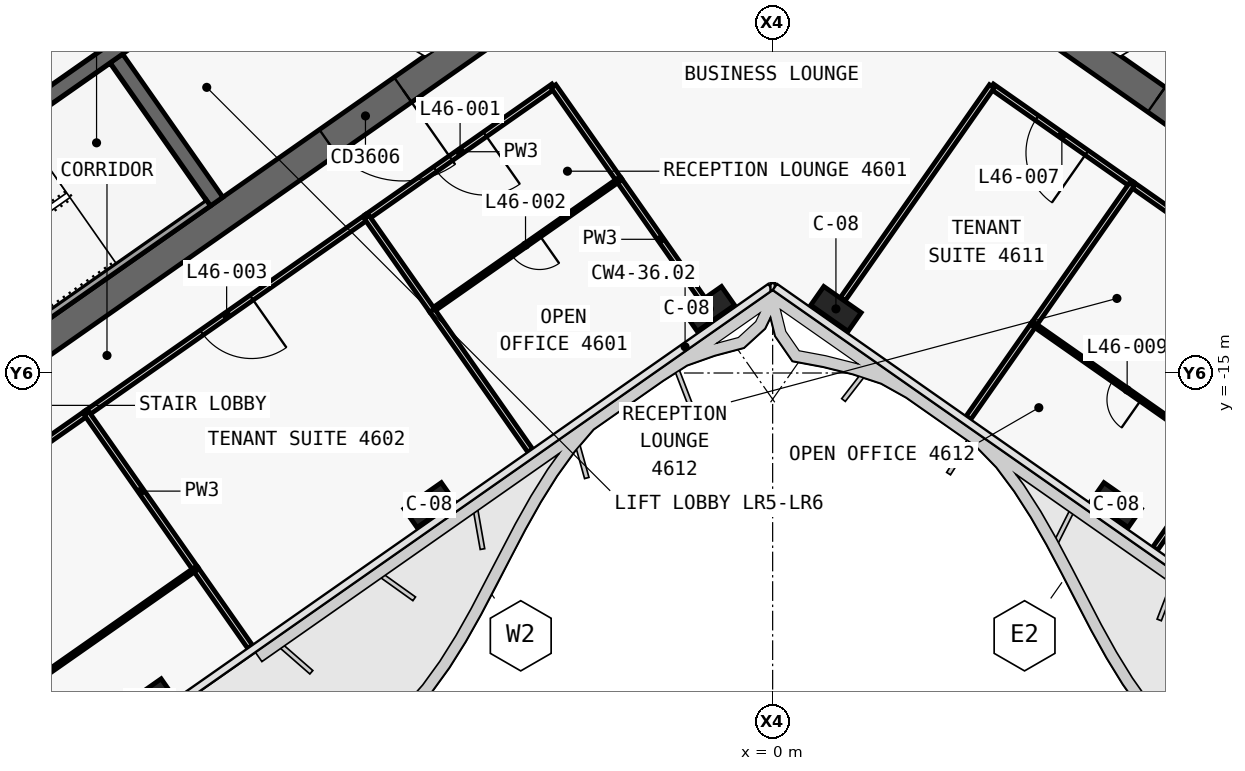
"""IFC4 building model, lengths in metres.
Left out: names, types, materials, properties, quantities, classifications, styles, units other than length and angle.
Written with IfcOpenShell. Run it as: python <this file> out.ifc"""

import sys

from ifc_helpers import new_model, si_unit, direction, frame, frame_2d, origin, origin_2d, place, context, subcontext, project, spatial, polyline, rectangle, outline, extrude, element, fill, save


model = new_model("IFC4")
c1 = context("Model", 3, precision=1e-05, world=origin(), true_north=direction((0.0, 1.0)))
c2 = subcontext(c1, "Body", "Model", "MODEL_VIEW")
j1 = project(units=[si_unit("LENGTHUNIT", "METRE"), si_unit("PLANEANGLEUNIT", "RADIAN")], contexts=[c1])
p1 = place(None, origin())
s1 = spatial("IfcSite", under=j1, at=p1, CompositionType="ELEMENT")
p2 = place(p1, origin())
s2 = spatial("IfcBuilding", under=s1, at=p2, CompositionType="ELEMENT")
p3 = place(p2, frame((0.0, 0.0, 198.3)))
s3 = spatial("IfcBuildingStorey", under=s2, at=p3, CompositionType="ELEMENT", Elevation=198.3)
p4 = place(p3, frame((0.029, 11.984, 0.0), z_axis=(0.0, 0.0, 1.0), x_axis=(-0.819151382952, -0.573577380837, 0.0)))
e1 = element("IfcWall", 1, at=p4, inside=s3, PredefinedType="SHEAR", context=c2, shape_type="SweptSolid", body=[
    extrude(outline(polyline([(33.898, 0.4), (0.56, 0.4), (-0.0, -0.4), (33.898, -0.4), (33.898, 0.4)])), origin(), (0.0, 0.0, 1.0), 3.9),
])
p5 = place(p3, frame((0.029, -0.712, 0.0), z_axis=(0.0, 0.0, 1.0), x_axis=(-0.819151758019, -0.573576845187, 0.0)))
e2 = element("IfcWall", 2, at=p5, inside=s3, PredefinedType="SHEAR", context=c2, shape_type="SweptSolid", body=[
    extrude(outline(polyline([(26.616, 0.4), (0.56, 0.4), (-0.0, -0.4), (26.616, -0.4), (26.616, 0.4)])), origin(), (0.0, 0.0, 1.0), 3.9),
])
p6 = place(p5, frame((2.966, 0.0, 0.0)))
e3 = element("IfcOpeningElement", 3, at=p6, cuts=e2, PredefinedType="OPENING", context=c2, shape_type="SweptSolid", body=[
    extrude(rectangle(XDim=2.4, YDim=2.1, at=frame_2d((1.2, 1.05))), frame((0.0, 0.41, 0.0), z_axis=(0.0, -1.0, 0.0), x_axis=(1.0, 0.0, 0.0)), (0.0, 0.0, 1.0), 0.82),
])
p7 = place(p5, frame((11.916, 0.0, 0.0)))
e4 = element("IfcOpeningElement", 4, at=p7, cuts=e2, PredefinedType="OPENING", context=c2, shape_type="SweptSolid", body=[
    extrude(rectangle(XDim=2.4, YDim=2.1, at=frame_2d((1.2, 1.05))), frame((0.0, 0.41, 0.0), z_axis=(0.0, -1.0, 0.0), x_axis=(1.0, 0.0, 0.0)), (0.0, 0.0, 1.0), 0.82),
])
p8 = place(p3, frame((-14.63, -10.488, 0.0), z_axis=(0.0, 0.0, 1.0), x_axis=(-0.573611936273, 0.819127185829, 0.0)))
e5 = element("IfcWall", 5, at=p8, inside=s3, PredefinedType="SHEAR", context=c2, shape_type="SweptSolid", body=[
    extrude(outline(polyline([(4.6, 0.2), (0.0, 0.2), (0.0, -0.2), (4.6, -0.2), (4.6, 0.2)])), origin(), (0.0, 0.0, 1.0), 3.9),
])
p9 = place(p3, frame((-2.638, 3.768, 0.0), z_axis=(0.0, 0.0, 1.0), x_axis=(-0.81915267502, -0.573575535572, 0.0)))
e6 = element("IfcWall", 6, at=p9, inside=s3, PredefinedType="SHEAR", context=c2, shape_type="SweptSolid", body=[
    extrude(outline(polyline([(26.2, 0.2), (0.0, 0.2), (0.0, -0.2), (26.2, -0.2), (26.2, 0.2)])), origin(), (0.0, 0.0, 1.0), 3.9),
])
p10 = place(p9, frame((1.169, 0.0, 0.0)))
e7 = element("IfcOpeningElement", 7, at=p10, cuts=e6, PredefinedType="OPENING", context=c2, shape_type="SweptSolid", body=[
    extrude(rectangle(XDim=1.1, YDim=2.1, at=frame_2d((0.55, 1.05))), frame((0.0, 0.21, 0.0), z_axis=(0.0, -1.0, 0.0), x_axis=(1.0, 0.0, 0.0)), (0.0, 0.0, 1.0), 0.42),
])
p11 = place(p9, frame((3.206, 0.0, 0.0)))
e8 = element("IfcOpeningElement", 8, at=p11, cuts=e6, PredefinedType="OPENING", context=c2, shape_type="SweptSolid", body=[
    extrude(rectangle(XDim=1.1, YDim=2.1, at=frame_2d((0.55, 1.05))), frame((0.0, 0.21, 0.0), z_axis=(0.0, -1.0, 0.0), x_axis=(1.0, 0.0, 0.0)), (0.0, 0.0, 1.0), 0.42),
])
p12 = place(p9, frame((5.244, 0.0, 0.0)))
e9 = element("IfcOpeningElement", 9, at=p12, cuts=e6, PredefinedType="OPENING", context=c2, shape_type="SweptSolid", body=[
    extrude(rectangle(XDim=1.1, YDim=2.1, at=frame_2d((0.55, 1.05))), frame((0.0, 0.21, 0.0), z_axis=(0.0, -1.0, 0.0), x_axis=(1.0, 0.0, 0.0)), (0.0, 0.0, 1.0), 0.42),
])
p13 = place(p9, frame((7.281, 0.0, 0.0)))
e10 = element("IfcOpeningElement", 10, at=p13, cuts=e6, PredefinedType="OPENING", context=c2, shape_type="SweptSolid", body=[
    extrude(rectangle(XDim=1.1, YDim=2.1, at=frame_2d((0.55, 1.05))), frame((0.0, 0.21, 0.0), z_axis=(0.0, -1.0, 0.0), x_axis=(1.0, 0.0, 0.0)), (0.0, 0.0, 1.0), 0.42),
])
p14 = place(p9, frame((9.688, 0.0, 0.0)))
e11 = element("IfcOpeningElement", 11, at=p14, cuts=e6, PredefinedType="OPENING", context=c2, shape_type="SweptSolid", body=[
    extrude(rectangle(XDim=1.1, YDim=2.1, at=frame_2d((0.55, 1.05))), frame((0.0, 0.21, 0.0), z_axis=(0.0, -1.0, 0.0), x_axis=(1.0, 0.0, 0.0)), (0.0, 0.0, 1.0), 0.42),
])
p15 = place(p9, frame((11.863, 0.0, 0.0)))
e12 = element("IfcOpeningElement", 12, at=p15, cuts=e6, PredefinedType="OPENING", context=c2, shape_type="SweptSolid", body=[
    extrude(rectangle(XDim=1.1, YDim=2.1, at=frame_2d((0.55, 1.05))), frame((0.0, 0.21, 0.0), z_axis=(0.0, -1.0, 0.0), x_axis=(1.0, 0.0, 0.0)), (0.0, 0.0, 1.0), 0.42),
])
p16 = place(p9, frame((13.722, 0.0, 0.0)))
e13 = element("IfcOpeningElement", 13, at=p16, cuts=e6, PredefinedType="OPENING", context=c2, shape_type="SweptSolid", body=[
    extrude(rectangle(XDim=1.0, YDim=2.1, at=frame_2d((0.5, 1.05))), frame((0.0, 0.21, 0.0), z_axis=(0.0, -1.0, 0.0), x_axis=(1.0, 0.0, 0.0)), (0.0, 0.0, 1.0), 0.42),
])
p17 = place(p9, frame((15.798, 0.0, 0.0)))
e14 = element("IfcOpeningElement", 14, at=p17, cuts=e6, PredefinedType="OPENING", context=c2, shape_type="SweptSolid", body=[
    extrude(rectangle(XDim=1.0, YDim=2.1, at=frame_2d((0.5, 1.05))), frame((0.0, 0.21, 0.0), z_axis=(0.0, -1.0, 0.0), x_axis=(1.0, 0.0, 0.0)), (0.0, 0.0, 1.0), 0.42),
])
p18 = place(p3, frame((-0.029, 11.984, 0.0), z_axis=(0.0, 0.0, 1.0), x_axis=(0.819151382952, -0.573577380837, 0.0)))
e15 = element("IfcWall", 15, at=p18, inside=s3, PredefinedType="SHEAR", context=c2, shape_type="SweptSolid", body=[
    extrude(outline(polyline([(33.898, 0.4), (-0.0, 0.4), (0.56, -0.4), (33.898, -0.4), (33.898, 0.4)])), origin(), (0.0, 0.0, 1.0), 3.9),
])
p19 = place(p3, frame((-0.029, -0.712, 0.0), z_axis=(0.0, 0.0, 1.0), x_axis=(0.819151758019, -0.573576845187, 0.0)))
e16 = element("IfcWall", 16, at=p19, inside=s3, PredefinedType="SHEAR", context=c2, shape_type="SweptSolid", body=[
    extrude(outline(polyline([(26.616, 0.4), (-0.0, 0.4), (0.56, -0.4), (26.616, -0.4), (26.616, 0.4)])), origin(), (0.0, 0.0, 1.0), 3.9),
])
p20 = place(p19, frame((1.166, 0.0, 0.0)))
e17 = element("IfcOpeningElement", 17, at=p20, cuts=e16, PredefinedType="OPENING", context=c2, shape_type="SweptSolid", body=[
    extrude(rectangle(XDim=1.5, YDim=2.1, at=frame_2d((0.75, 1.05))), frame((0.0, 0.41, 0.0), z_axis=(0.0, -1.0, 0.0), x_axis=(1.0, 0.0, 0.0)), (0.0, 0.0, 1.0), 0.82),
])
p21 = place(p19, frame((12.366, 0.0, 0.0)))
e18 = element("IfcOpeningElement", 18, at=p21, cuts=e16, PredefinedType="OPENING", context=c2, shape_type="SweptSolid", body=[
    extrude(rectangle(XDim=1.5, YDim=2.1, at=frame_2d((0.75, 1.05))), frame((0.0, 0.41, 0.0), z_axis=(0.0, -1.0, 0.0), x_axis=(1.0, 0.0, 0.0)), (0.0, 0.0, 1.0), 0.82),
])
p22 = place(p3, frame((2.638, 3.768, 0.0), z_axis=(0.0, 0.0, 1.0), x_axis=(0.81915267502, -0.573575535572, 0.0)))
e19 = element("IfcWall", 19, at=p22, inside=s3, PredefinedType="SHEAR", context=c2, shape_type="SweptSolid", body=[
    extrude(outline(polyline([(0.0, 0.2), (0.0, -0.2), (26.2, -0.2), (26.2, 0.2), (0.0, 0.2)])), origin(), (0.0, 0.0, 1.0), 3.9),
])
p23 = place(p22, frame((9.637, 0.0, 0.0)))
e20 = element("IfcOpeningElement", 20, at=p23, cuts=e19, PredefinedType="OPENING", context=c2, shape_type="SweptSolid", body=[
    extrude(rectangle(XDim=1.2, YDim=2.1, at=frame_2d((0.6, 1.05))), frame((0.0, 0.21, 0.0), z_axis=(0.0, -1.0, 0.0), x_axis=(1.0, 0.0, 0.0)), (0.0, 0.0, 1.0), 0.42),
])
p24 = place(p22, frame((11.812, 0.0, 0.0)))
e21 = element("IfcOpeningElement", 21, at=p24, cuts=e19, PredefinedType="OPENING", context=c2, shape_type="SweptSolid", body=[
    extrude(rectangle(XDim=1.2, YDim=2.1, at=frame_2d((0.6, 1.05))), frame((0.0, 0.21, 0.0), z_axis=(0.0, -1.0, 0.0), x_axis=(1.0, 0.0, 0.0)), (0.0, 0.0, 1.0), 0.42),
])
p25 = place(p22, frame((13.988, 0.0, 0.0)))
e22 = element("IfcOpeningElement", 22, at=p25, cuts=e19, PredefinedType="OPENING", context=c2, shape_type="SweptSolid", body=[
    extrude(rectangle(XDim=1.2, YDim=2.1, at=frame_2d((0.6, 1.05))), frame((0.0, 0.21, 0.0), z_axis=(0.0, -1.0, 0.0), x_axis=(1.0, 0.0, 0.0)), (0.0, 0.0, 1.0), 0.42),
])
p26 = place(p22, frame((16.262, 0.0, 0.0)))
e23 = element("IfcOpeningElement", 23, at=p26, cuts=e19, PredefinedType="OPENING", context=c2, shape_type="SweptSolid", body=[
    extrude(rectangle(XDim=1.0, YDim=2.1, at=frame_2d((0.5, 1.05))), frame((0.0, 0.21, 0.0), z_axis=(0.0, -1.0, 0.0), x_axis=(1.0, 0.0, 0.0)), (0.0, 0.0, 1.0), 0.42),
])
for number, where, z_axis, x_axis in (
    (24, (-1.665, -13.313, 0.0), (0.0, 0.0, 1.0), (-0.819, -0.574, 0.0)),
    (25, (-9.038, -18.475, 0.0), (0.0, 0.0, 1.0), (-0.819, -0.574, 0.0)),
    (26, (-16.41, -23.637, 0.0), (0.0, 0.0, 1.0), (-0.819, -0.574, 0.0)),
    (27, (1.665, -13.313, 0.0), (0.0, 0.0, 1.0), (0.819, -0.574, 0.0)),
    (28, (9.038, -18.475, 0.0), (0.0, 0.0, 1.0), (0.819, -0.574, 0.0)),
):
    element("IfcColumn", number, at=place(p3, frame(where, z_axis=z_axis, x_axis=x_axis)), inside=s3, PredefinedType="COLUMN", context=c2, shape_type="SweptSolid", body=[
        extrude(rectangle(XDim=1.2, YDim=0.6, at=origin_2d()), origin(), (0.0, 0.0, 1.0), 3.9),
    ])
p27 = place(p3, frame((-14.851, -10.521, 0.0), z_axis=(0.0, 0.0, 1.0), x_axis=(-0.819141584393, -0.57359137434, 0.0)))
e29 = element("IfcWall", 29, at=p27, inside=s3, PredefinedType="SOLIDWALL", context=c2, shape_type="SweptSolid", body=[
    extrude(rectangle(XDim=8.0, YDim=0.2, at=frame_2d((4.0, 0.0))), origin(), (0.0, 0.0, 1.0), 3.62),
])
p28 = place(p3, frame((9.454, -10.038, 0.0), z_axis=(0.0, 0.0, 1.0), x_axis=(-0.819142740634, 0.573589723117, 0.0)))
e30 = element("IfcWall", 30, at=p28, inside=s3, PredefinedType="PARTITIONING", context=c2, shape_type="SweptSolid", body=[
    extrude(rectangle(XDim=4.502, YDim=0.15, at=frame_2d((2.251, 0.0))), origin(), (0.0, 0.0, 1.0), 3.0),
])
p29 = place(p28, frame((1.451, 0.0, 0.0)))
e31 = element("IfcOpeningElement", 31, at=p29, cuts=e30, PredefinedType="OPENING", context=c2, shape_type="SweptSolid", body=[
    extrude(rectangle(XDim=1.6, YDim=2.1, at=frame_2d((0.8, 1.05))), frame((0.0, 0.085, 0.0), z_axis=(0.0, -1.0, 0.0), x_axis=(1.0, 0.0, 0.0)), (0.0, 0.0, 1.0), 0.17),
])
p30 = place(p3, frame((14.369, -13.479, 0.0), z_axis=(0.0, 0.0, 1.0), x_axis=(-0.819165052243, 0.573557858619, 0.0)))
e32 = element("IfcWall", 32, at=p30, inside=s3, PredefinedType="PARTITIONING", context=c2, shape_type="SweptSolid", body=[
    extrude(rectangle(XDim=6.004, YDim=0.15, at=frame_2d((3.002, 0.0))), origin(), (0.0, 0.0, 1.0), 3.0),
])
p31 = place(p30, frame((2.202, 0.0, 0.0)))
e33 = element("IfcOpeningElement", 33, at=p31, cuts=e32, PredefinedType="OPENING", context=c2, shape_type="SweptSolid", body=[
    extrude(rectangle(XDim=1.6, YDim=2.1, at=frame_2d((0.8, 1.05))), frame((0.0, 0.085, 0.0), z_axis=(0.0, -1.0, 0.0), x_axis=(1.0, 0.0, 0.0)), (0.0, 0.0, 1.0), 0.17),
])
p32 = place(p3, frame((-5.766, -7.456, 0.0), z_axis=(0.0, 0.0, 1.0), x_axis=(-0.819147828287, -0.573582457378, 0.0)))
e34 = element("IfcWall", 34, at=p32, inside=s3, PredefinedType="PARTITIONING", context=c2, shape_type="SweptSolid", body=[
    extrude(rectangle(XDim=6.002, YDim=0.15, at=frame_2d((3.001, 0.0))), origin(), (0.0, 0.0, 1.0), 3.0),
])
p33 = place(p32, frame((2.201, 0.0, 0.0)))
e35 = element("IfcOpeningElement", 35, at=p33, cuts=e34, PredefinedType="OPENING", context=c2, shape_type="SweptSolid", body=[
    extrude(rectangle(XDim=1.6, YDim=2.1, at=frame_2d((0.8, 1.05))), frame((0.0, 0.085, 0.0), z_axis=(0.0, -1.0, 0.0), x_axis=(1.0, 0.0, 0.0)), (0.0, 0.0, 1.0), 0.17),
])
p34 = place(p3, frame((-10.68, -10.896, 0.0), z_axis=(0.0, 0.0, 1.0), x_axis=(-0.819151661297, -0.57357698332, 0.0)))
e36 = element("IfcWall", 36, at=p34, inside=s3, PredefinedType="PARTITIONING", context=c2, shape_type="SweptSolid", body=[
    extrude(rectangle(XDim=9.004, YDim=0.15, at=frame_2d((4.502, 0.0))), origin(), (0.0, 0.0, 1.0), 3.0),
])
p35 = place(p34, frame((3.702, 0.0, 0.0)))
e37 = element("IfcOpeningElement", 37, at=p35, cuts=e36, PredefinedType="OPENING", context=c2, shape_type="SweptSolid", body=[
    extrude(rectangle(XDim=1.6, YDim=2.1, at=frame_2d((0.8, 1.05))), frame((0.0, 0.085, 0.0), z_axis=(0.0, -1.0, 0.0), x_axis=(1.0, 0.0, 0.0)), (0.0, 0.0, 1.0), 0.17),
])
p36 = place(p3, frame((-18.052, -16.058, 0.0), z_axis=(0.0, 0.0, 1.0), x_axis=(-0.819158166934, -0.573567692209, 0.0)))
e38 = element("IfcWall", 38, at=p36, inside=s3, PredefinedType="PARTITIONING", context=c2, shape_type="SweptSolid", body=[
    extrude(rectangle(XDim=14.464, YDim=0.15, at=frame_2d((7.232, 0.0))), origin(), (0.0, 0.0, 1.0), 3.0),
])
p37 = place(p36, frame((6.432, 0.0, 0.0)))
e39 = element("IfcOpeningElement", 39, at=p37, cuts=e38, PredefinedType="OPENING", context=c2, shape_type="SweptSolid", body=[
    extrude(rectangle(XDim=1.6, YDim=2.1, at=frame_2d((0.8, 1.05))), frame((0.0, 0.085, 0.0), z_axis=(0.0, -1.0, 0.0), x_axis=(1.0, 0.0, 0.0)), (0.0, 0.0, 1.0), 0.17),
])
p38 = place(p3, frame((6.872, -13.722, 0.0), z_axis=(0.0, 0.0, 1.0), x_axis=(-0.57364797641, -0.819101946745, 0.0)))
e40 = element("IfcWall", 40, at=p38, inside=s3, PredefinedType="PARTITIONING", context=c2, shape_type="SweptSolid", body=[
    extrude(rectangle(XDim=3.001, YDim=0.15, at=frame_2d((1.5, 0.0))), origin(), (0.0, 0.0, 1.0), 2.9),
])
p39 = place(p3, frame((9.452, -10.037, 0.0), z_axis=(0.0, 0.0, 1.0), x_axis=(-0.573553333433, -0.819168220641, 0.0)))
e41 = element("IfcWall", 41, at=p39, inside=s3, PredefinedType="PARTITIONING", context=c2, shape_type="SweptSolid", body=[
    extrude(rectangle(XDim=4.502, YDim=0.15, at=frame_2d((2.251, 0.0))), origin(), (0.0, 0.0, 1.0), 3.62),
])
p40 = place(p3, frame((1.849, -13.051, 0.0), z_axis=(0.0, 0.0, 1.0), x_axis=(0.573577493031, 0.819151304393, 0.0)))
e42 = element("IfcWall", 42, at=p40, inside=s3, PredefinedType="PARTITIONING", context=c2, shape_type="SweptSolid", body=[
    extrude(rectangle(XDim=6.83, YDim=0.15, at=frame_2d((3.415, 0.0))), origin(), (0.0, 0.0, 1.0), 3.0),
])
p41 = place(p3, frame((11.786, -17.165, 0.0), z_axis=(0.0, 0.0, 1.0), x_axis=(-0.819163097304, 0.573560650686, 0.0)))
e43 = element("IfcWall", 43, at=p41, inside=s3, PredefinedType="PARTITIONING", context=c2, shape_type="SweptSolid", body=[
    extrude(rectangle(XDim=6.0, YDim=0.1, at=frame_2d((3.0, 0.0))), origin(), (0.0, 0.0, 1.0), 3.0),
])
p42 = place(p41, frame((2.55, 0.0, 0.0)))
e44 = element("IfcOpeningElement", 44, at=p42, cuts=e43, PredefinedType="OPENING", context=c2, shape_type="SweptSolid", body=[
    extrude(rectangle(XDim=0.9, YDim=2.1, at=frame_2d((0.45, 1.05))), frame((0.0, 0.06, 0.0), z_axis=(0.0, -1.0, 0.0), x_axis=(1.0, 0.0, 0.0)), (0.0, 0.0, 1.0), 0.12),
])
p43 = place(p3, frame((11.786, -17.165, 0.0), z_axis=(0.0, 0.0, 1.0), x_axis=(-0.573566142353, -0.819159252128, 0.0)))
e45 = element("IfcWall", 45, at=p43, inside=s3, PredefinedType="PARTITIONING", context=c2, shape_type="SweptSolid", body=[
    extrude(rectangle(XDim=2.999, YDim=0.15, at=frame_2d((1.5, 0.0))), origin(), (0.0, 0.0, 1.0), 2.9),
])
p44 = place(p3, frame((-1.849, -13.051, 0.0), z_axis=(0.0, 0.0, 1.0), x_axis=(-0.573586379587, 0.81914508187, 0.0)))
e46 = element("IfcWall", 46, at=p44, inside=s3, PredefinedType="PARTITIONING", context=c2, shape_type="SweptSolid", body=[
    extrude(rectangle(XDim=3.831, YDim=0.15, at=frame_2d((1.916, 0.0))), origin(), (0.0, 0.0, 1.0), 3.0),
])
p45 = place(p3, frame((-4.044, -9.915, 0.0), z_axis=(0.0, 0.0, 1.0), x_axis=(-0.573609604409, 0.819128818764, 0.0)))
e47 = element("IfcWall", 47, at=p45, inside=s3, PredefinedType="PARTITIONING", context=c2, shape_type="SweptSolid", body=[
    extrude(rectangle(XDim=3.004, YDim=0.15, at=frame_2d((1.502, 0.0))), origin(), (0.0, 0.0, 1.0), 3.0),
])
p46 = place(p3, frame((-4.045, -9.914, 0.0), z_axis=(0.0, 0.0, 1.0), x_axis=(-0.819149710902, -0.573579768758, 0.0)))
e48 = element("IfcWall", 48, at=p46, inside=s3, PredefinedType="PARTITIONING", context=c2, shape_type="SweptSolid", body=[
    extrude(rectangle(XDim=6.0, YDim=0.1, at=frame_2d((3.0, 0.0))), origin(), (0.0, 0.0, 1.0), 3.0),
])
p47 = place(p46, frame((2.55, 0.0, 0.0)))
e49 = element("IfcOpeningElement", 49, at=p47, cuts=e48, PredefinedType="OPENING", context=c2, shape_type="SweptSolid", body=[
    extrude(rectangle(XDim=0.9, YDim=2.1, at=frame_2d((0.45, 1.05))), frame((0.0, 0.06, 0.0), z_axis=(0.0, -1.0, 0.0), x_axis=(1.0, 0.0, 0.0)), (0.0, 0.0, 1.0), 0.12),
])
p48 = place(p3, frame((-6.379, -17.041, 0.0), z_axis=(0.0, 0.0, 1.0), x_axis=(-0.573564311442, 0.819160534108, 0.0)))
e50 = element("IfcWall", 50, at=p48, inside=s3, PredefinedType="PARTITIONING", context=c2, shape_type="SweptSolid", body=[
    extrude(rectangle(XDim=4.499, YDim=0.15, at=frame_2d((2.25, 0.0))), origin(), (0.0, 0.0, 1.0), 2.9),
])
p49 = place(p3, frame((-8.96, -13.355, 0.0), z_axis=(0.0, 0.0, 1.0), x_axis=(-0.573615254604, 0.819124862085, 0.0)))
e51 = element("IfcWall", 51, at=p49, inside=s3, PredefinedType="PARTITIONING", context=c2, shape_type="SweptSolid", body=[
    extrude(rectangle(XDim=3.0, YDim=0.15, at=frame_2d((1.5, 0.0))), origin(), (0.0, 0.0, 1.0), 3.62),
])
p50 = place(p3, frame((-13.752, -22.203, 0.0), z_axis=(0.0, 0.0, 1.0), x_axis=(-0.57356715775, 0.819158541157, 0.0)))
e52 = element("IfcWall", 52, at=p50, inside=s3, PredefinedType="PARTITIONING", context=c2, shape_type="SweptSolid", body=[
    extrude(rectangle(XDim=2.501, YDim=0.15, at=frame_2d((1.25, 0.0))), origin(), (0.0, 0.0, 1.0), 2.9),
])
p51 = place(p3, frame((-15.185, -20.157, 0.0), z_axis=(0.0, 0.0, 1.0), x_axis=(-0.573590089534, 0.819142484058, 0.0)))
e53 = element("IfcWall", 53, at=p51, inside=s3, PredefinedType="PARTITIONING", context=c2, shape_type="SweptSolid", body=[
    extrude(rectangle(XDim=5.002, YDim=0.15, at=frame_2d((2.501, 0.0))), origin(), (0.0, 0.0, 1.0), 3.62),
])
p52 = place(p3, frame((-15.185, -20.156, 0.0), z_axis=(0.0, 0.0, 1.0), x_axis=(-0.819143623959, -0.573588461641, 0.0)))
e54 = element("IfcWall", 54, at=p52, inside=s3, PredefinedType="PARTITIONING", context=c2, shape_type="SweptSolid", body=[
    extrude(rectangle(XDim=15.2, YDim=0.1, at=frame_2d((7.6, 0.0))), origin(), (0.0, 0.0, 1.0), 2.9),
])
p53 = place(p52, frame((7.15, 0.0, 0.0)))
e55 = element("IfcOpeningElement", 55, at=p53, cuts=e54, PredefinedType="OPENING", context=c2, shape_type="SweptSolid", body=[
    extrude(rectangle(XDim=0.9, YDim=2.1, at=frame_2d((0.45, 1.05))), frame((0.0, 0.06, 0.0), z_axis=(0.0, -1.0, 0.0), x_axis=(1.0, 0.0, 0.0)), (0.0, 0.0, 1.0), 0.12),
])
p54 = place(p7, origin())
e56 = element("IfcDoor", 56, at=p54, inside=s3, OperationType="DOUBLE_DOOR_SINGLE_SWING", PredefinedType="DOOR", context=c2, shape_type="SweptSolid", body=[
    extrude(rectangle(XDim=2.4, YDim=2.1, at=frame_2d((1.2, 1.05))), frame((0.0, 0.025, 0.0), z_axis=(0.0, -1.0, 0.0), x_axis=(1.0, 0.0, 0.0)), (0.0, 0.0, 1.0), 0.05),
])
fill(e4, e56)
p55 = place(p21, origin())
e57 = element("IfcDoor", 57, at=p55, inside=s3, OperationType="DOUBLE_DOOR_SINGLE_SWING", PredefinedType="DOOR", context=c2, shape_type="SweptSolid", body=[
    extrude(rectangle(XDim=1.5, YDim=2.1, at=frame_2d((0.75, 1.05))), frame((0.0, 0.025, 0.0), z_axis=(0.0, -1.0, 0.0), x_axis=(1.0, 0.0, 0.0)), (0.0, 0.0, 1.0), 0.05),
])
fill(e18, e57)
p56 = place(p33, origin())
e58 = element("IfcDoor", 58, at=p56, inside=s3, OperationType="DOUBLE_DOOR_SINGLE_SWING", PredefinedType="DOOR", context=c2, shape_type="SweptSolid", body=[
    extrude(rectangle(XDim=1.6, YDim=2.1, at=frame_2d((0.8, 1.05))), frame((0.0, 0.025, 0.0), z_axis=(0.0, -1.0, 0.0), x_axis=(1.0, 0.0, 0.0)), (0.0, 0.0, 1.0), 0.05),
])
fill(e35, e58)
p57 = place(p47, origin())
e59 = element("IfcDoor", 59, at=p57, inside=s3, OperationType="SINGLE_SWING_RIGHT", PredefinedType="DOOR", context=c2, shape_type="SweptSolid", body=[
    extrude(rectangle(XDim=0.9, YDim=2.1, at=frame_2d((0.45, 1.05))), frame((0.0, 0.025, 0.0), z_axis=(0.0, -1.0, 0.0), x_axis=(1.0, 0.0, 0.0)), (0.0, 0.0, 1.0), 0.05),
])
fill(e49, e59)
p58 = place(p35, origin())
e60 = element("IfcDoor", 60, at=p58, inside=s3, OperationType="DOUBLE_DOOR_SINGLE_SWING", PredefinedType="DOOR", context=c2, shape_type="SweptSolid", body=[
    extrude(rectangle(XDim=1.6, YDim=2.1, at=frame_2d((0.8, 1.05))), frame((0.0, 0.025, 0.0), z_axis=(0.0, -1.0, 0.0), x_axis=(1.0, 0.0, 0.0)), (0.0, 0.0, 1.0), 0.05),
])
fill(e37, e60)
p59 = place(p29, origin())
e61 = element("IfcDoor", 61, at=p59, inside=s3, OperationType="DOUBLE_DOOR_SINGLE_SWING", PredefinedType="DOOR", context=c2, shape_type="SweptSolid", body=[
    extrude(rectangle(XDim=1.6, YDim=2.1, at=frame_2d((0.8, 1.05))), frame((0.0, 0.025, 0.0), z_axis=(0.0, -1.0, 0.0), x_axis=(1.0, 0.0, 0.0)), (0.0, 0.0, 1.0), 0.05),
])
fill(e31, e61)
p60 = place(p42, origin())
e62 = element("IfcDoor", 62, at=p60, inside=s3, OperationType="SINGLE_SWING_LEFT", PredefinedType="DOOR", context=c2, shape_type="SweptSolid", body=[
    extrude(rectangle(XDim=0.9, YDim=2.1, at=frame_2d((0.45, 1.05))), frame((0.0, 0.025, 0.0), z_axis=(0.0, -1.0, 0.0), x_axis=(1.0, 0.0, 0.0)), (0.0, 0.0, 1.0), 0.05),
])
fill(e44, e62)
save(model, sys.argv[1])
